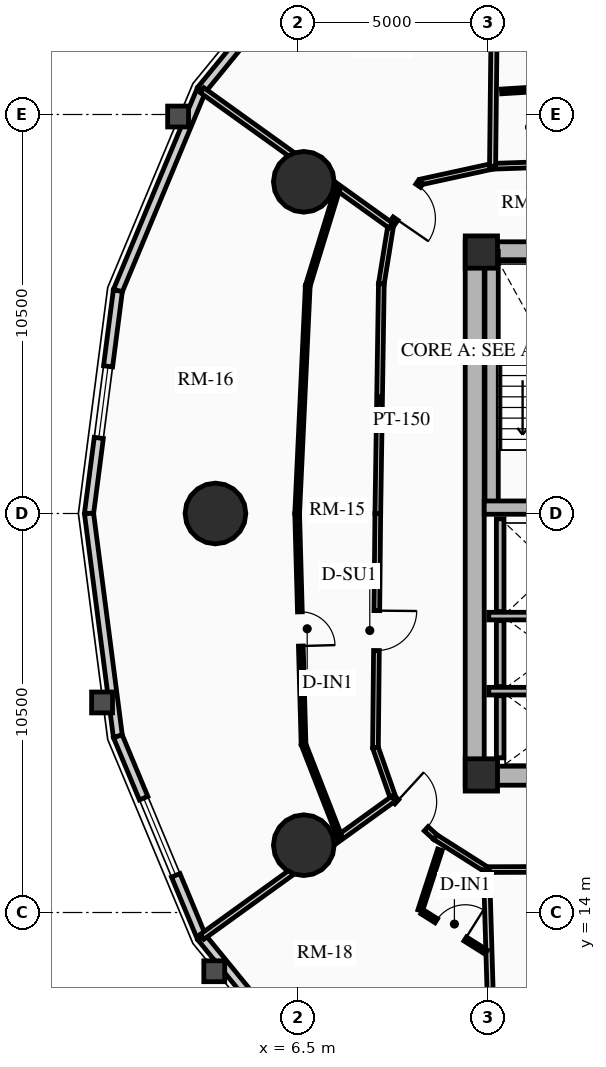
"""IFC4 building model, lengths in metres.
Left out: names, types, materials, properties, quantities, classifications, styles, units other than length and angle.
Written with IfcOpenShell. Run it as: python <this file> out.ifc"""

import sys

from ifc_helpers import new_model, si_unit, direction, frame, frame_2d, origin, origin_2d, place, context, subcontext, project, spatial, rectangle, circle, extrude, source, transform, mapped, element, fill, save


model = new_model("IFC4")
c1 = context("Model", 3, precision=1e-05, world=origin(), true_north=direction((0.0, 1.0)))
c2 = subcontext(c1, "Body", "Model", "MODEL_VIEW")
j1 = project(units=[si_unit("LENGTHUNIT", "METRE"), si_unit("PLANEANGLEUNIT", "RADIAN")], contexts=[c1])
p1 = place(None, origin())
s1 = spatial("IfcSite", under=j1, at=p1, CompositionType="ELEMENT")
p2 = place(p1, origin())
s2 = spatial("IfcBuilding", under=s1, at=p2, CompositionType="ELEMENT")
p3 = place(p2, frame((0.0, 0.0, 45.28)))
s3 = spatial("IfcBuildingStorey", under=s2, at=p3, CompositionType="ELEMENT", Elevation=45.28)
p4 = place(p3, frame((11.15, 17.35, 0.0), z_axis=(0.0, 0.0, 1.0), x_axis=(0.0, 1.0, 0.0)))
e1 = element("IfcWall", 1, at=p4, inside=s3, PredefinedType="SHEAR", context=c2, shape_type="SweptSolid", body=[
    extrude(rectangle(XDim=14.3, YDim=0.5, at=frame_2d((7.15, 0.0))), origin(), (0.0, 0.0, 1.0), 2.91),
])
p5 = place(p3, frame((11.15, 17.6, 0.0), z_axis=(0.0, 0.0, 1.0), x_axis=(1.0, 0.0, 0.0)))
e2 = element("IfcWall", 2, at=p5, inside=s3, PredefinedType="SHEAR", context=c2, shape_type="SweptSolid", body=[
    extrude(rectangle(XDim=10.7, YDim=0.5, at=frame_2d((5.35, 0.0))), origin(), (0.0, 0.0, 1.0), 2.91),
])
m1 = source(origin(), c2, "Body", "SweptSolid", [
    extrude(rectangle(XDim=1.5, YDim=2.02, at=frame_2d((0.75, 1.01))), frame((0.0, 0.26, 0.0), z_axis=(0.0, -1.0, 0.0), x_axis=(1.0, 0.0, 0.0)), (0.0, 0.0, 1.0), 0.52),
])
p6 = place(p5, frame((5.45, 0.0, 0.0)))
e3 = element("IfcOpeningElement", 3, at=p6, cuts=e2, PredefinedType="OPENING", context=c2, shape_type="MappedRepresentation", body=[
    mapped(m1, transform((0.0, 0.0, 0.0), x_axis=(1.0, 0.0, 0.0), y_axis=(0.0, 1.0, 0.0), z_axis=(0.0, 0.0, 1.0), scale=1.0)),
])
p7 = place(p3, frame((11.15, 31.4, 0.0), z_axis=(0.0, 0.0, 1.0), x_axis=(1.0, 0.0, 0.0)))
e4 = element("IfcWall", 4, at=p7, inside=s3, PredefinedType="SHEAR", context=c2, shape_type="SweptSolid", body=[
    extrude(rectangle(XDim=10.7, YDim=0.5, at=frame_2d((5.35, 0.0))), origin(), (0.0, 0.0, 1.0), 2.91),
])
p8 = place(p7, frame((4.6, 0.0, 0.0)))
e5 = element("IfcOpeningElement", 5, at=p8, cuts=e4, PredefinedType="OPENING", context=c2, shape_type="MappedRepresentation", body=[
    mapped(m1, transform((0.0, 0.0, 0.0), x_axis=(1.0, 0.0, 0.0), y_axis=(0.0, 1.0, 0.0), z_axis=(0.0, 0.0, 1.0), scale=1.0)),
])
p9 = place(p3, frame((11.595, 24.655, 0.0), z_axis=(0.0, 0.0, 1.0), x_axis=(0.0, 1.0, 0.0)))
e6 = element("IfcWall", 6, at=p9, inside=s3, PredefinedType="SHEAR", context=c2, shape_type="SweptSolid", body=[
    extrude(rectangle(XDim=6.745, YDim=0.35, at=frame_2d((3.373, 0.0))), origin(), (0.0, 0.0, 1.0), 2.91),
])
p10 = place(p3, frame((11.4, 24.655, 0.0), z_axis=(0.0, 0.0, 1.0), x_axis=(1.0, 0.0, 0.0)))
e7 = element("IfcWall", 7, at=p10, inside=s3, PredefinedType="SHEAR", context=c2, shape_type="SweptSolid", body=[
    extrude(rectangle(XDim=3.285, YDim=0.35, at=frame_2d((1.643, 0.0))), origin(), (0.0, 0.0, 1.0), 2.91),
])
for number, where, z_axis, x_axis in (
    (8, (11.325, 17.62, 0.0), (0.0, 0.0, 1.0), (1.0, 0.0, 0.0)),
    (9, (11.325, 31.38, 0.0), (0.0, 0.0, 1.0), (1.0, 0.0, 0.0)),
):
    element("IfcColumn", number, at=place(p3, frame(where, z_axis=z_axis, x_axis=x_axis)), inside=s3, PredefinedType="COLUMN", context=c2, shape_type="SweptSolid", body=[
        extrude(rectangle(XDim=0.85, YDim=0.85, at=origin_2d()), origin(), (0.0, 0.0, 1.0), 2.91),
    ])
for number, where, z_axis, x_axis in (
    (10, (6.653, 33.229, 0.0), (0.0, 0.0, 1.0), (1.0, 0.0, 0.0)),
    (11, (4.328, 24.5, 0.0), (0.0, 0.0, 1.0), (1.0, 0.0, 0.0)),
    (12, (6.653, 15.771, 0.0), (0.0, 0.0, 1.0), (1.0, 0.0, 0.0)),
):
    element("IfcColumn", number, at=place(p3, frame(where, z_axis=z_axis, x_axis=x_axis)), inside=s3, PredefinedType="USERDEFINED", context=c2, shape_type="SweptSolid", body=[
        extrude(circle(Radius=0.8, at=origin_2d()), origin(), (0.0, 0.0, 1.0), 2.91),
    ])
p11 = place(p3, frame((3.961, 35.65, 0.0), z_axis=(0.0, 0.0, 1.0), x_axis=(0.632710215588, 0.774388651189, 0.0)))
e13 = element("IfcWall", 13, at=p11, inside=s3, PredefinedType="SOLIDWALL", context=c2, shape_type="SweptSolid", body=[
    extrude(rectangle(XDim=5.419, YDim=0.24, at=frame_2d((2.71, 0.0))), origin(), (0.0, 0.0, 1.0), 2.073),
])
m2 = source(origin(), c2, "Body", "SweptSolid", [
    extrude(rectangle(XDim=1.9, YDim=1.35, at=frame_2d((0.95, 0.675))), frame((0.0, 0.13, 0.0), z_axis=(0.0, -1.0, 0.0), x_axis=(1.0, 0.0, 0.0)), (0.0, 0.0, 1.0), 0.26),
])
p12 = place(p11, frame((1.76, 0.0, 0.65)))
e14 = element("IfcOpeningElement", 14, at=p12, cuts=e13, PredefinedType="OPENING", context=c2, shape_type="MappedRepresentation", body=[
    mapped(m2, transform((0.0, 0.0, 0.0), x_axis=(1.0, 0.0, 0.0), y_axis=(0.0, 1.0, 0.0), z_axis=(0.0, 0.0, 1.0), scale=1.0)),
])
p13 = place(p3, frame((1.76, 30.362, 0.0), z_axis=(0.0, 0.0, 1.0), x_axis=(0.38430970593, 0.923204229804, 0.0)))
e15 = element("IfcWall", 15, at=p13, inside=s3, PredefinedType="SOLIDWALL", context=c2, shape_type="SweptSolid", body=[
    extrude(rectangle(XDim=5.728, YDim=0.24, at=frame_2d((2.864, 0.0))), origin(), (0.0, 0.0, 1.0), 2.073),
])
p14 = place(p3, frame((1.001, 24.5, 0.0), z_axis=(0.0, 0.0, 1.0), x_axis=(0.128329107357, 0.991731637191, 0.0)))
e16 = element("IfcWall", 16, at=p14, inside=s3, PredefinedType="SOLIDWALL", context=c2, shape_type="SweptSolid", body=[
    extrude(rectangle(XDim=5.911, YDim=0.24, at=frame_2d((2.956, 0.0))), origin(), (0.0, 0.0, 1.0), 2.073),
])
p15 = place(p14, frame((2.005, 0.0, 0.65)))
e17 = element("IfcOpeningElement", 17, at=p15, cuts=e16, PredefinedType="OPENING", context=c2, shape_type="MappedRepresentation", body=[
    mapped(m2, transform((0.0, 0.0, 0.0), x_axis=(1.0, 0.0, 0.0), y_axis=(0.0, 1.0, 0.0), z_axis=(0.0, 0.0, 1.0), scale=1.0)),
])
p16 = place(p3, frame((1.76, 18.638, 0.0), z_axis=(0.0, 0.0, 1.0), x_axis=(-0.128329107357, 0.991731637191, 0.0)))
e18 = element("IfcWall", 18, at=p16, inside=s3, PredefinedType="SOLIDWALL", context=c2, shape_type="SweptSolid", body=[
    extrude(rectangle(XDim=5.911, YDim=0.24, at=frame_2d((2.956, 0.0))), origin(), (0.0, 0.0, 1.0), 2.073),
])
p17 = place(p3, frame((3.961, 13.35, 0.0), z_axis=(0.0, 0.0, 1.0), x_axis=(-0.38430970593, 0.923204229804, 0.0)))
e19 = element("IfcWall", 19, at=p17, inside=s3, PredefinedType="SOLIDWALL", context=c2, shape_type="SweptSolid", body=[
    extrude(rectangle(XDim=5.728, YDim=0.24, at=frame_2d((2.864, 0.0))), origin(), (0.0, 0.0, 1.0), 2.073),
])
m3 = source(origin(), c2, "Body", "SweptSolid", [
    extrude(rectangle(XDim=2.2, YDim=1.35, at=frame_2d((1.1, 0.675))), frame((0.0, 0.13, 0.0), z_axis=(0.0, -1.0, 0.0), x_axis=(1.0, 0.0, 0.0)), (0.0, 0.0, 1.0), 0.26),
])
p18 = place(p17, frame((1.764, 0.0, 0.65)))
e20 = element("IfcOpeningElement", 20, at=p18, cuts=e19, PredefinedType="OPENING", context=c2, shape_type="MappedRepresentation", body=[
    mapped(m3, transform((0.0, 0.0, 0.0), x_axis=(1.0, 0.0, 0.0), y_axis=(0.0, 1.0, 0.0), z_axis=(0.0, 0.0, 1.0), scale=1.0)),
])
p19 = place(p3, frame((7.39, 9.153, 0.0), z_axis=(0.0, 0.0, 1.0), x_axis=(-0.632710215588, 0.774388651189, 0.0)))
e21 = element("IfcWall", 21, at=p19, inside=s3, PredefinedType="SOLIDWALL", context=c2, shape_type="SweptSolid", body=[
    extrude(rectangle(XDim=5.419, YDim=0.24, at=frame_2d((2.71, 0.0))), origin(), (0.0, 0.0, 1.0), 2.073),
])
p20 = place(p3, frame((11.52, 21.8, 0.0), z_axis=(0.0, 0.0, 1.0), x_axis=(1.0, 0.0, 0.0)))
e22 = element("IfcWall", 22, at=p20, inside=s3, PredefinedType="SHEAR", context=c2, shape_type="SweptSolid", body=[
    extrude(rectangle(XDim=2.97, YDim=0.2, at=frame_2d((1.485, 0.0))), origin(), (0.0, 0.0, 1.0), 2.91),
])
p21 = place(p3, frame((11.82, 21.92, 0.0), z_axis=(0.0, 0.0, 1.0), x_axis=(0.0, 1.0, 0.0)))
e23 = element("IfcWall", 23, at=p21, inside=s3, PredefinedType="SHEAR", context=c2, shape_type="SweptSolid", body=[
    extrude(rectangle(XDim=2.44, YDim=0.2, at=frame_2d((1.22, 0.0))), origin(), (0.0, 0.0, 1.0), 2.91),
])
p22 = place(p3, frame((11.52, 19.825, 0.0), z_axis=(0.0, 0.0, 1.0), x_axis=(1.0, 0.0, 0.0)))
e24 = element("IfcWall", 24, at=p22, inside=s3, PredefinedType="SHEAR", context=c2, shape_type="SweptSolid", body=[
    extrude(rectangle(XDim=2.97, YDim=0.2, at=frame_2d((1.485, 0.0))), origin(), (0.0, 0.0, 1.0), 2.91),
])
p23 = place(p3, frame((11.82, 19.945, 0.0), z_axis=(0.0, 0.0, 1.0), x_axis=(0.0, 1.0, 0.0)))
e25 = element("IfcWall", 25, at=p23, inside=s3, PredefinedType="SHEAR", context=c2, shape_type="SweptSolid", body=[
    extrude(rectangle(XDim=1.735, YDim=0.2, at=frame_2d((0.867, 0.0))), origin(), (0.0, 0.0, 1.0), 2.91),
])
p24 = place(p3, frame((11.82, 18.07, 0.0), z_axis=(0.0, 0.0, 1.0), x_axis=(0.0, 1.0, 0.0)))
e26 = element("IfcWall", 26, at=p24, inside=s3, PredefinedType="SHEAR", context=c2, shape_type="SweptSolid", body=[
    extrude(rectangle(XDim=1.635, YDim=0.2, at=frame_2d((0.817, 0.0))), origin(), (0.0, 0.0, 1.0), 2.91),
])
p25 = place(p3, frame((18.143, 33.86, 0.0), z_axis=(0.0, 0.0, 1.0), x_axis=(-0.999419208319, -0.034077060363, 0.0)))
e27 = element("IfcWall", 27, at=p25, inside=s3, PredefinedType="PARTITIONING", context=c2, shape_type="SweptSolid", body=[
    extrude(rectangle(XDim=6.527, YDim=0.15, at=frame_2d((3.263, 0.0))), origin(), (0.0, 0.0, 1.0), 2.159),
])
p26 = place(p3, frame((11.62, 33.637, 0.0), z_axis=(0.0, 0.0, 1.0), x_axis=(-0.97702579435, -0.213121085711, 0.0)))
e28 = element("IfcWall", 28, at=p26, inside=s3, PredefinedType="PARTITIONING", context=c2, shape_type="SweptSolid", body=[
    extrude(rectangle(XDim=1.935, YDim=0.15, at=frame_2d((0.967, 0.0))), origin(), (0.0, 0.0, 1.0), 2.159),
])
p27 = place(p3, frame((9.729, 33.225, 0.0), z_axis=(0.0, 0.0, 1.0), x_axis=(-0.567183649484, -0.82359134755, 0.0)))
e29 = element("IfcWall", 29, at=p27, inside=s3, PredefinedType="PARTITIONING", context=c2, shape_type="SweptSolid", body=[
    extrude(rectangle(XDim=1.392, YDim=0.15, at=frame_2d((0.696, 0.0))), origin(), (0.0, 0.0, 1.0), 2.159),
])
m4 = source(origin(), c2, "Body", "SweptSolid", [
    extrude(rectangle(XDim=1.05, YDim=2.015, at=frame_2d((0.525, 1.007))), frame((0.0, 0.085, 0.0), z_axis=(0.0, -1.0, 0.0), x_axis=(1.0, 0.0, 0.0)), (0.0, 0.0, 1.0), 0.17),
])
p28 = place(p27, frame((0.12, 0.0, 0.0)))
e30 = element("IfcOpeningElement", 30, at=p28, cuts=e29, PredefinedType="OPENING", context=c2, shape_type="MappedRepresentation", body=[
    mapped(m4, transform((0.0, 0.0, 0.0), x_axis=(1.0, 0.0, 0.0), y_axis=(0.0, 1.0, 0.0), z_axis=(0.0, 0.0, 1.0), scale=1.0)),
])
p29 = place(p3, frame((8.94, 32.078, 0.0), z_axis=(0.0, 0.0, 1.0), x_axis=(-0.159148467753, -0.98725466077, 0.0)))
e31 = element("IfcWall", 31, at=p29, inside=s3, PredefinedType="PARTITIONING", context=c2, shape_type="SweptSolid", body=[
    extrude(rectangle(XDim=1.554, YDim=0.15, at=frame_2d((0.777, 0.0))), origin(), (0.0, 0.0, 1.0), 2.205),
])
p30 = place(p3, frame((8.693, 30.544, 0.0), z_axis=(0.0, 0.0, 1.0), x_axis=(-0.015307007986, -0.99988284089, 0.0)))
e32 = element("IfcWall", 32, at=p30, inside=s3, PredefinedType="PARTITIONING", context=c2, shape_type="SweptSolid", body=[
    extrude(rectangle(XDim=6.045, YDim=0.15, at=frame_2d((3.022, 0.0))), origin(), (0.0, 0.0, 1.0), 2.635),
])
p31 = place(p3, frame((8.6, 24.5, 0.0), z_axis=(0.0, 0.0, 1.0), x_axis=(-0.010023665349, -0.999949761805, 0.0)))
e33 = element("IfcWall", 33, at=p31, inside=s3, PredefinedType="PARTITIONING", context=c2, shape_type="SweptSolid", body=[
    extrude(rectangle(XDim=6.162, YDim=0.15, at=frame_2d((3.081, 0.0))), origin(), (0.0, 0.0, 1.0), 2.159),
])
p32 = place(p31, frame((2.556, 0.0, 0.0)))
e34 = element("IfcOpeningElement", 34, at=p32, cuts=e33, PredefinedType="OPENING", context=c2, shape_type="MappedRepresentation", body=[
    mapped(m4, transform((0.0, 0.0, 0.0), x_axis=(1.0, 0.0, 0.0), y_axis=(0.0, 1.0, 0.0), z_axis=(0.0, 0.0, 1.0), scale=1.0)),
])
p33 = place(p3, frame((8.538, 18.338, 0.0), z_axis=(0.0, 0.0, 1.0), x_axis=(0.331358150167, -0.94350504838, 0.0)))
e35 = element("IfcWall", 35, at=p33, inside=s3, PredefinedType="PARTITIONING", context=c2, shape_type="SweptSolid", body=[
    extrude(rectangle(XDim=1.424, YDim=0.15, at=frame_2d((0.712, 0.0))), origin(), (0.0, 0.0, 1.0), 2.205),
])
p34 = place(p3, frame((9.01, 16.994, 0.0), z_axis=(0.0, 0.0, 1.0), x_axis=(0.737701798986, -0.67512669609, 0.0)))
e36 = element("IfcWall", 36, at=p34, inside=s3, PredefinedType="PARTITIONING", context=c2, shape_type="SweptSolid", body=[
    extrude(rectangle(XDim=1.498, YDim=0.15, at=frame_2d((0.749, 0.0))), origin(), (0.0, 0.0, 1.0), 2.159),
])
p35 = place(p34, frame((0.12, 0.0, 0.0)))
e37 = element("IfcOpeningElement", 37, at=p35, cuts=e36, PredefinedType="OPENING", context=c2, shape_type="MappedRepresentation", body=[
    mapped(m4, transform((0.0, 0.0, 0.0), x_axis=(1.0, 0.0, 0.0), y_axis=(0.0, 1.0, 0.0), z_axis=(0.0, 0.0, 1.0), scale=1.0)),
])
p36 = place(p3, frame((10.115, 15.983, 0.0), z_axis=(0.0, 0.0, 1.0), x_axis=(0.843995849351, -0.536349705209, 0.0)))
e38 = element("IfcWall", 38, at=p36, inside=s3, PredefinedType="PARTITIONING", context=c2, shape_type="SweptSolid", body=[
    extrude(rectangle(XDim=1.593, YDim=0.15, at=frame_2d((0.796, 0.0))), origin(), (0.0, 0.0, 1.0), 2.205),
])
p37 = place(p3, frame((11.46, 15.129, 0.0), z_axis=(0.0, 0.0, 1.0), x_axis=(0.999993513287, 0.003601858435, 0.0)))
e39 = element("IfcWall", 39, at=p37, inside=s3, PredefinedType="PARTITIONING", context=c2, shape_type="SweptSolid", body=[
    extrude(rectangle(XDim=3.321, YDim=0.15, at=frame_2d((1.661, 0.0))), origin(), (0.0, 0.0, 1.0), 2.159),
])
p38 = place(p37, frame((1.643, 0.0, 0.0)))
e40 = element("IfcOpeningElement", 40, at=p38, cuts=e39, PredefinedType="OPENING", context=c2, shape_type="MappedRepresentation", body=[
    mapped(m4, transform((0.0, 0.0, 0.0), x_axis=(1.0, 0.0, 0.0), y_axis=(0.0, 1.0, 0.0), z_axis=(0.0, 0.0, 1.0), scale=1.0)),
])
p39 = place(p3, frame((11.62, 33.637, 0.0), z_axis=(0.0, 0.0, 1.0), x_axis=(0.01090774254, 0.999940508807, 0.0)))
e41 = element("IfcWall", 41, at=p39, inside=s3, PredefinedType="PARTITIONING", context=c2, shape_type="SweptSolid", body=[
    extrude(rectangle(XDim=8.886, YDim=0.16, at=frame_2d((4.443, 0.0))), origin(), (0.0, 0.0, 1.0), 2.073),
])
p40 = place(p3, frame((8.94, 32.078, 0.0), z_axis=(0.0, 0.0, 1.0), x_axis=(-0.812546070691, 0.582896974606, 0.0)))
e42 = element("IfcWall", 42, at=p40, inside=s3, PredefinedType="PARTITIONING", context=c2, shape_type="SweptSolid", body=[
    extrude(rectangle(XDim=6.107, YDim=0.16, at=frame_2d((3.054, 0.0))), origin(), (0.0, 0.0, 1.0), 2.073),
])
p41 = place(p3, frame((9.01, 16.994, 0.0), z_axis=(0.0, 0.0, 1.0), x_axis=(-0.810839958558, -0.585267940012, 0.0)))
e43 = element("IfcWall", 43, at=p41, inside=s3, PredefinedType="PARTITIONING", context=c2, shape_type="SweptSolid", body=[
    extrude(rectangle(XDim=6.207, YDim=0.16, at=frame_2d((3.104, 0.0))), origin(), (0.0, 0.0, 1.0), 2.073),
])
p42 = place(p3, frame((11.46, 15.129, 0.0), z_axis=(0.0, 0.0, 1.0), x_axis=(0.029703270067, -0.999558760528, 0.0)))
e44 = element("IfcWall", 44, at=p42, inside=s3, PredefinedType="PARTITIONING", context=c2, shape_type="SweptSolid", body=[
    extrude(rectangle(XDim=8.655, YDim=0.16, at=frame_2d((4.328, 0.0))), origin(), (0.0, 0.0, 1.0), 2.073),
])
p43 = place(p3, frame((14.803, 35.788, 0.0), z_axis=(0.0, 0.0, 1.0), x_axis=(-0.998116078946, -0.06135383403, 0.0)))
e45 = element("IfcWall", 45, at=p43, inside=s3, PredefinedType="PARTITIONING", context=c2, shape_type="SweptSolid", body=[
    extrude(rectangle(XDim=2.953, YDim=0.125, at=frame_2d((1.476, 0.0))), origin(), (0.0, 0.0, 1.0), 2.159),
])
m5 = source(origin(), c2, "Body", "SweptSolid", [
    extrude(rectangle(XDim=0.9, YDim=2.005, at=frame_2d((0.45, 1.002))), frame((0.0, 0.073, 0.0), z_axis=(0.0, -1.0, 0.0), x_axis=(1.0, 0.0, 0.0)), (0.0, 0.0, 1.0), 0.145),
])
p44 = place(p43, frame((0.12, 0.0, 0.0)))
e46 = element("IfcOpeningElement", 46, at=p44, cuts=e45, PredefinedType="OPENING", context=c2, shape_type="MappedRepresentation", body=[
    mapped(m5, transform((0.0, 0.0, 0.0), x_axis=(1.0, 0.0, 0.0), y_axis=(0.0, 1.0, 0.0), z_axis=(0.0, 0.0, 1.0), scale=1.0)),
])
p45 = place(p3, frame((7.55, 33.075, 0.0), z_axis=(0.0, 0.0, 1.0), x_axis=(-0.29356532185, -0.955939015736, 0.0)))
e47 = element("IfcWall", 47, at=p45, inside=s3, PredefinedType="PARTITIONING", context=c2, shape_type="SweptSolid", body=[
    extrude(rectangle(XDim=2.703, YDim=0.125, at=frame_2d((1.352, 0.0))), origin(), (0.0, 0.0, 1.0), 2.159),
])
p46 = place(p3, frame((6.757, 30.491, 0.0), z_axis=(0.0, 0.0, 1.0), x_axis=(-0.046524684881, -0.998917140556, 0.0)))
e48 = element("IfcWall", 48, at=p46, inside=s3, PredefinedType="PARTITIONING", context=c2, shape_type="SweptSolid", body=[
    extrude(rectangle(XDim=5.998, YDim=0.125, at=frame_2d((2.999, 0.0))), origin(), (0.0, 0.0, 1.0), 2.635),
])
p47 = place(p3, frame((6.478, 24.5, 0.0), z_axis=(0.0, 0.0, 1.0), x_axis=(0.027593153947, -0.999619236437, 0.0)))
e49 = element("IfcWall", 49, at=p47, inside=s3, PredefinedType="PARTITIONING", context=c2, shape_type="SweptSolid", body=[
    extrude(rectangle(XDim=6.078, YDim=0.125, at=frame_2d((3.039, 0.0))), origin(), (0.0, 0.0, 1.0), 2.159),
])
p48 = place(p47, frame((2.589, 0.0, 0.0)))
e50 = element("IfcOpeningElement", 50, at=p48, cuts=e49, PredefinedType="OPENING", context=c2, shape_type="MappedRepresentation", body=[
    mapped(m5, transform((0.0, 0.0, 0.0), x_axis=(1.0, 0.0, 0.0), y_axis=(0.0, 1.0, 0.0), z_axis=(0.0, 0.0, 1.0), scale=1.0)),
])
p49 = place(p3, frame((6.646, 18.424, 0.0), z_axis=(0.0, 0.0, 1.0), x_axis=(0.363782486735, -0.931483924899, 0.0)))
e51 = element("IfcWall", 51, at=p49, inside=s3, PredefinedType="PARTITIONING", context=c2, shape_type="SweptSolid", body=[
    extrude(rectangle(XDim=2.627, YDim=0.125, at=frame_2d((1.313, 0.0))), origin(), (0.0, 0.0, 1.0), 2.159),
])
p50 = place(p3, frame((10.235, 15.651, 0.0), z_axis=(0.0, 0.0, 1.0), x_axis=(-0.309082792716, -0.951035134602, 0.0)))
e52 = element("IfcWall", 52, at=p50, inside=s3, PredefinedType="PARTITIONING", context=c2, shape_type="SweptSolid", body=[
    extrude(rectangle(XDim=1.683, YDim=0.125, at=frame_2d((0.842, 0.0))), origin(), (0.0, 0.0, 1.0), 2.205),
])
p51 = place(p3, frame((9.767, 14.017, 0.0), z_axis=(0.0, 0.0, 1.0), x_axis=(0.846347510567, -0.532631102506, 0.0)))
e53 = element("IfcWall", 53, at=p51, inside=s3, PredefinedType="PARTITIONING", context=c2, shape_type="SweptSolid", body=[
    extrude(rectangle(XDim=1.991, YDim=0.125, at=frame_2d((0.995, 0.0))), origin(), (0.0, 0.0, 1.0), 2.635),
])
p52 = place(p51, frame((0.439, 0.0, 0.0)))
e54 = element("IfcOpeningElement", 54, at=p52, cuts=e53, PredefinedType="OPENING", context=c2, shape_type="MappedRepresentation", body=[
    mapped(m5, transform((0.0, 0.0, 0.0), x_axis=(1.0, 0.0, 0.0), y_axis=(0.0, 1.0, 0.0), z_axis=(0.0, 0.0, 1.0), scale=1.0)),
])
m6 = source(origin(), c2, "Body", "SweptSolid", [
    extrude(rectangle(XDim=1.9, YDim=1.35, at=frame_2d((0.95, 0.675))), frame((0.0, 0.03, 0.0), z_axis=(0.0, -1.0, 0.0), x_axis=(1.0, 0.0, 0.0)), (0.0, 0.0, 1.0), 0.06),
])
p53 = place(p15, origin())
e55 = element("IfcWindow", 55, at=p53, inside=s3, PartitioningType="DOUBLE_PANEL_VERTICAL", PredefinedType="WINDOW", context=c2, shape_type="MappedRepresentation", body=[
    mapped(m6, transform((0.0, 0.0, 0.0), x_axis=(1.0, 0.0, 0.0), y_axis=(0.0, 1.0, 0.0), z_axis=(0.0, 0.0, 1.0), scale=1.0)),
])
fill(e17, e55)
m7 = source(origin(), c2, "Body", "SweptSolid", [
    extrude(rectangle(XDim=2.2, YDim=1.35, at=frame_2d((1.1, 0.675))), frame((0.0, 0.03, 0.0), z_axis=(0.0, -1.0, 0.0), x_axis=(1.0, 0.0, 0.0)), (0.0, 0.0, 1.0), 0.06),
])
p54 = place(p18, origin())
e56 = element("IfcWindow", 56, at=p54, inside=s3, PartitioningType="DOUBLE_PANEL_VERTICAL", PredefinedType="WINDOW", context=c2, shape_type="MappedRepresentation", body=[
    mapped(m7, transform((0.0, 0.0, 0.0), x_axis=(1.0, 0.0, 0.0), y_axis=(0.0, 1.0, 0.0), z_axis=(0.0, 0.0, 1.0), scale=1.0)),
])
fill(e20, e56)
m8 = source(origin(), c2, "Body", "SweptSolid", [
    extrude(rectangle(XDim=1.05, YDim=2.015, at=frame_2d((0.525, 1.007))), frame((0.0, 0.025, 0.0), z_axis=(0.0, -1.0, 0.0), x_axis=(1.0, 0.0, 0.0)), (0.0, 0.0, 1.0), 0.05),
])
p55 = place(p28, origin())
e57 = element("IfcDoor", 57, at=p55, inside=s3, OperationType="SINGLE_SWING_RIGHT", PredefinedType="DOOR", context=c2, shape_type="MappedRepresentation", body=[
    mapped(m8, transform((0.0, 0.0, 0.0), x_axis=(1.0, 0.0, 0.0), y_axis=(0.0, 1.0, 0.0), z_axis=(0.0, 0.0, 1.0), scale=1.0)),
])
fill(e30, e57)
p56 = place(p32, origin())
e58 = element("IfcDoor", 58, at=p56, inside=s3, OperationType="SINGLE_SWING_LEFT", PredefinedType="DOOR", context=c2, shape_type="MappedRepresentation", body=[
    mapped(m8, transform((0.0, 0.0, 0.0), x_axis=(1.0, 0.0, 0.0), y_axis=(0.0, 1.0, 0.0), z_axis=(0.0, 0.0, 1.0), scale=1.0)),
])
fill(e34, e58)
m9 = source(origin(), c2, "Body", "SweptSolid", [
    extrude(rectangle(XDim=0.9, YDim=2.005, at=frame_2d((0.45, 1.002))), frame((0.0, 0.025, 0.0), z_axis=(0.0, -1.0, 0.0), x_axis=(1.0, 0.0, 0.0)), (0.0, 0.0, 1.0), 0.05),
])
p57 = place(p48, origin())
e59 = element("IfcDoor", 59, at=p57, inside=s3, OperationType="SINGLE_SWING_RIGHT", PredefinedType="DOOR", context=c2, shape_type="MappedRepresentation", body=[
    mapped(m9, transform((0.0, 0.0, 0.0), x_axis=(1.0, 0.0, 0.0), y_axis=(0.0, 1.0, 0.0), z_axis=(0.0, 0.0, 1.0), scale=1.0)),
])
fill(e50, e59)
p58 = place(p35, origin())
e60 = element("IfcDoor", 60, at=p58, inside=s3, OperationType="SINGLE_SWING_LEFT", PredefinedType="DOOR", context=c2, shape_type="MappedRepresentation", body=[
    mapped(m8, transform((0.0, 0.0, 0.0), x_axis=(1.0, 0.0, 0.0), y_axis=(0.0, 1.0, 0.0), z_axis=(0.0, 0.0, 1.0), scale=1.0)),
])
fill(e37, e60)
p59 = place(p52, origin())
e61 = element("IfcDoor", 61, at=p59, inside=s3, OperationType="SINGLE_SWING_RIGHT", PredefinedType="DOOR", context=c2, shape_type="MappedRepresentation", body=[
    mapped(m9, transform((0.0, 0.0, 0.0), x_axis=(1.0, 0.0, 0.0), y_axis=(0.0, 1.0, 0.0), z_axis=(0.0, 0.0, 1.0), scale=1.0)),
])
fill(e54, e61)
save(model, sys.argv[1])
